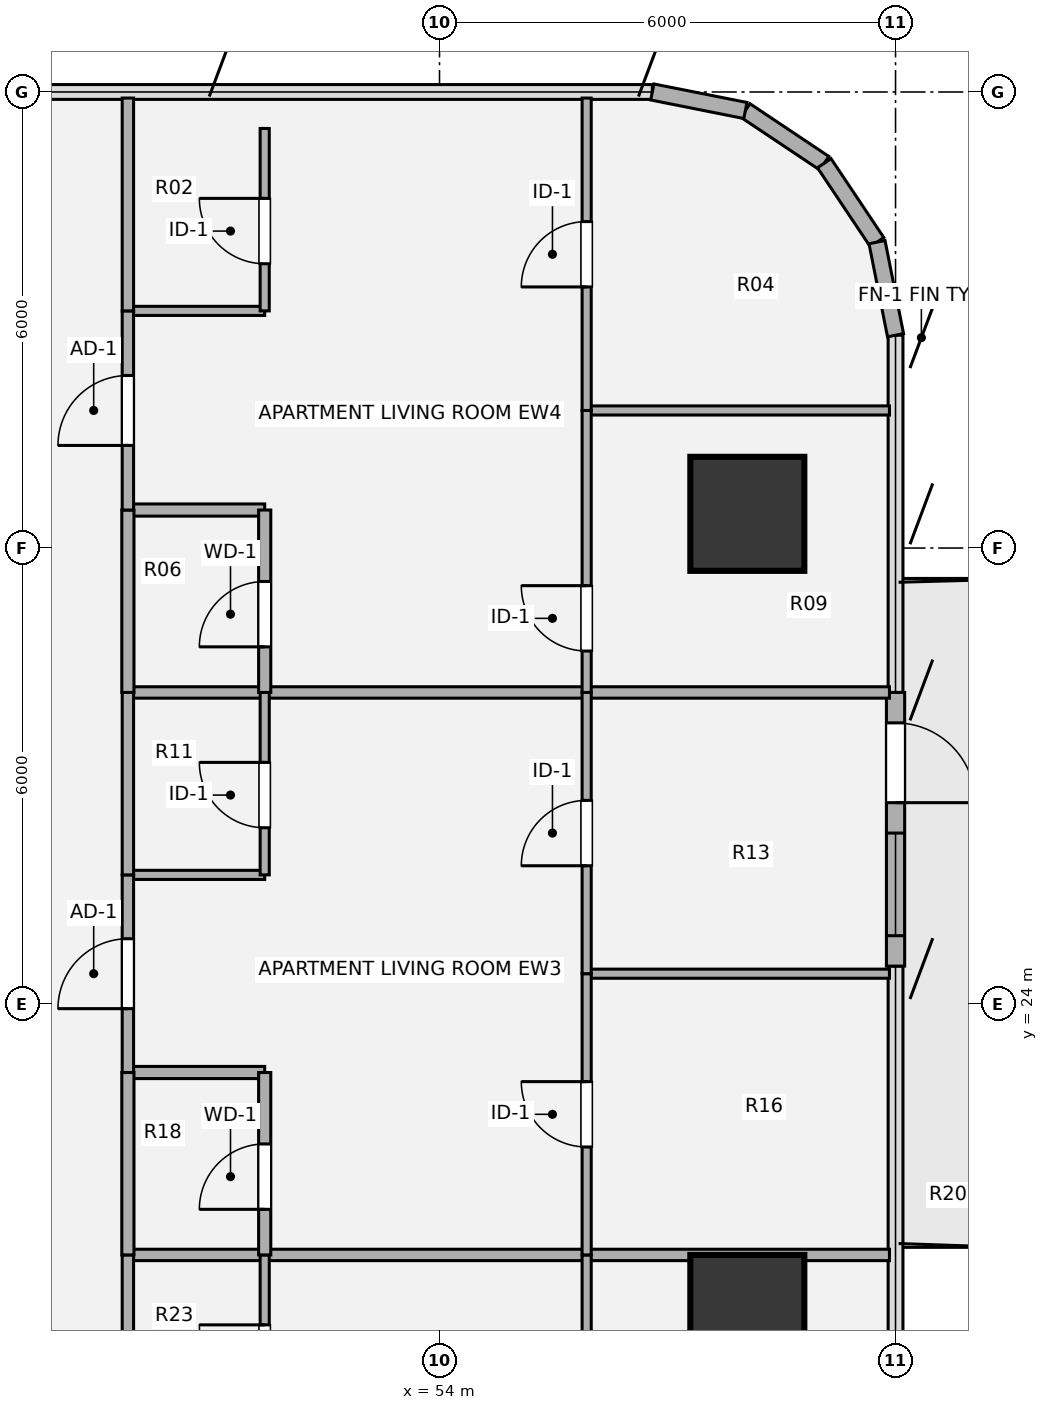
"""IFC4 building model, lengths in metres.
Left out: names, types, materials, properties, quantities, classifications, styles, units other than length and angle.
Written with IfcOpenShell. Run it as: python <this file> out.ifc"""

import sys

from ifc_helpers import new_model, si_unit, direction, frame, frame_2d, origin, origin_2d, place, context, subcontext, project, spatial, rectangle, hollow_circle, extrude, source, transform, mapped, element, fill, save


model = new_model("IFC4")
c1 = context("Model", 3, precision=1e-05, world=origin(), true_north=direction((0.0, 1.0)))
c2 = subcontext(c1, "Body", "Model", "MODEL_VIEW")
j1 = project(units=[si_unit("LENGTHUNIT", "METRE"), si_unit("PLANEANGLEUNIT", "RADIAN")], contexts=[c1])
p1 = place(None, origin())
s1 = spatial("IfcSite", under=j1, at=p1, CompositionType="ELEMENT")
p2 = place(p1, origin())
s2 = spatial("IfcBuilding", under=s1, at=p2, CompositionType="ELEMENT")
p3 = place(p2, frame((0.0, 0.0, 34.56)))
s3 = spatial("IfcBuildingStorey", under=s2, at=p3, CompositionType="ELEMENT", Elevation=34.56)
m1 = source(origin(), c2, "Body", "SweptSolid", [
    extrude(hollow_circle(Radius=0.75, WallThickness=0.05, at=origin_2d()), origin(), (0.0, 0.0, 1.0), 3.78),
])
for number, where, z_axis, x_axis in (
    (1, (58.05, 19.95, 0.0), (0.0, 0.0, 1.0), (1.0, 0.0, 0.0)),
    (2, (58.05, 30.45, 0.0), (0.0, 0.0, 1.0), (1.0, 0.0, 0.0)),
):
    element("IfcColumn", number, at=place(p3, frame(where, z_axis=z_axis, x_axis=x_axis)), inside=s3, PredefinedType="COLUMN", context=c2, shape_type="MappedRepresentation", body=[
        mapped(m1, transform((0.0, 0.0, 0.0), x_axis=(1.0, 0.0, 0.0), y_axis=(0.0, 1.0, 0.0), z_axis=(0.0, 0.0, 1.0), scale=1.0)),
    ])
for number, where, z_axis, x_axis in (
    (3, (58.025, 35.756, 0.0), (0.0, 0.0, 1.0), (0.831, -0.556, 0.0)),
    (4, (59.063, 35.063, 0.0), (0.0, 0.0, 1.0), (0.556, -0.831, 0.0)),
    (5, (59.756, 34.025, 0.0), (0.0, 0.0, 1.0), (0.195, -0.981, 0.0)),
):
    element("IfcWall", number, at=place(p3, frame(where, z_axis=z_axis, x_axis=x_axis)), inside=s3, PredefinedType="SOLIDWALL", context=c2, shape_type="SweptSolid", body=[
        extrude(rectangle(XDim=1.249, YDim=0.215, at=frame_2d((0.624, 0.0))), origin(), (0.0, 0.0, 1.0), 3.53),
    ])
p4 = place(p3, frame((60.0, 28.1, 0.0), z_axis=(0.0, 0.0, 1.0), x_axis=(0.0, -1.0, 0.0)))
e6 = element("IfcWall", 6, at=p4, inside=s3, PredefinedType="SOLIDWALL", context=c2, shape_type="SweptSolid", body=[
    extrude(rectangle(XDim=3.6, YDim=0.24, at=frame_2d((1.8, 0.0))), origin(), (0.0, 0.0, 1.0), 3.53),
])
p5 = place(p4, frame((0.4, 0.0, 0.0)))
e7 = element("IfcOpeningElement", 7, at=p5, cuts=e6, PredefinedType="OPENING", context=c2, shape_type="SweptSolid", body=[
    extrude(rectangle(XDim=1.05, YDim=2.15, at=origin_2d()), frame((0.525, 0.13, 1.075), z_axis=(0.0, -1.0, 0.0), x_axis=(1.0, 0.0, 0.0)), (0.0, 0.0, 1.0), 0.26),
])
p6 = place(p4, frame((1.85, 0.0, 0.85)))
e8 = element("IfcOpeningElement", 8, at=p6, cuts=e6, PredefinedType="OPENING", context=c2, shape_type="SweptSolid", body=[
    extrude(rectangle(XDim=1.35, YDim=1.35, at=origin_2d()), frame((0.675, 0.13, 0.675), z_axis=(0.0, -1.0, 0.0), x_axis=(1.0, 0.0, 0.0)), (0.0, 0.0, 1.0), 0.26),
])
p7 = place(p3, frame((56.8, 36.0, 0.0), z_axis=(0.0, 0.0, 1.0), x_axis=(0.980775717779, -0.195138390419, 0.0)))
e9 = element("IfcWall", 9, at=p7, inside=s3, PredefinedType="SOLIDWALL", context=c2, shape_type="SweptSolid", body=[
    extrude(rectangle(XDim=1.249, YDim=0.215, at=frame_2d((0.624, 0.0))), origin(), (0.0, 0.0, 1.0), 3.53),
])
p8 = place(p3, frame((49.9, 20.7, 0.0), z_axis=(0.0, 0.0, 1.0), x_axis=(1.0, 0.0, 0.0)))
e10 = element("IfcWall", 10, at=p8, inside=s3, PredefinedType="PARTITIONING", context=c2, shape_type="SweptSolid", body=[
    extrude(rectangle(XDim=10.02, YDim=0.15, at=frame_2d((5.01, 0.0))), origin(), (0.0, 0.0, 1.0), 2.982),
])
p9 = place(p3, frame((49.9, 23.1, 0.0), z_axis=(0.0, 0.0, 1.0), x_axis=(1.0, 0.0, 0.0)))
e11 = element("IfcWall", 11, at=p9, inside=s3, PredefinedType="PLUMBINGWALL", context=c2, shape_type="SweptSolid", body=[
    extrude(rectangle(XDim=1.8, YDim=0.16, at=frame_2d((0.9, 0.0))), origin(), (0.0, 0.0, 1.0), 3.055),
])
p10 = place(p3, frame((55.936, 24.4, 0.0), z_axis=(0.0, 0.0, 1.0), x_axis=(1.0, 0.0, 0.0)))
e12 = element("IfcWall", 12, at=p10, inside=s3, PredefinedType="PARTITIONING", context=c2, shape_type="SweptSolid", body=[
    extrude(rectangle(XDim=3.984, YDim=0.12, at=frame_2d((1.992, 0.0))), origin(), (0.0, 0.0, 1.0), 2.982),
])
p11 = place(p3, frame((49.9, 25.7, 0.0), z_axis=(0.0, 0.0, 1.0), x_axis=(1.0, 0.0, 0.0)))
e13 = element("IfcWall", 13, at=p11, inside=s3, PredefinedType="PARTITIONING", context=c2, shape_type="SweptSolid", body=[
    extrude(rectangle(XDim=1.8, YDim=0.12, at=frame_2d((0.9, 0.0))), origin(), (0.0, 0.0, 1.0), 2.982),
])
p12 = place(p3, frame((49.9, 28.1, 0.0), z_axis=(0.0, 0.0, 1.0), x_axis=(1.0, 0.0, 0.0)))
e14 = element("IfcWall", 14, at=p12, inside=s3, PredefinedType="PARTITIONING", context=c2, shape_type="SweptSolid", body=[
    extrude(rectangle(XDim=10.02, YDim=0.15, at=frame_2d((5.01, 0.0))), origin(), (0.0, 0.0, 1.0), 2.982),
])
p13 = place(p3, frame((49.9, 30.5, 0.0), z_axis=(0.0, 0.0, 1.0), x_axis=(1.0, 0.0, 0.0)))
e15 = element("IfcWall", 15, at=p13, inside=s3, PredefinedType="PLUMBINGWALL", context=c2, shape_type="SweptSolid", body=[
    extrude(rectangle(XDim=1.8, YDim=0.16, at=frame_2d((0.9, 0.0))), origin(), (0.0, 0.0, 1.0), 2.903),
])
p14 = place(p3, frame((55.936, 31.81, 0.0), z_axis=(0.0, 0.0, 1.0), x_axis=(1.0, 0.0, 0.0)))
e16 = element("IfcWall", 16, at=p14, inside=s3, PredefinedType="PARTITIONING", context=c2, shape_type="SweptSolid", body=[
    extrude(rectangle(XDim=3.984, YDim=0.12, at=frame_2d((1.992, 0.0))), origin(), (0.0, 0.0, 1.0), 3.5),
])
p15 = place(p3, frame((49.9, 33.12, 0.0), z_axis=(0.0, 0.0, 1.0), x_axis=(1.0, 0.0, 0.0)))
e17 = element("IfcWall", 17, at=p15, inside=s3, PredefinedType="PARTITIONING", context=c2, shape_type="SweptSolid", body=[
    extrude(rectangle(XDim=1.8, YDim=0.12, at=frame_2d((0.9, 0.0))), origin(), (0.0, 0.0, 1.0), 3.055),
])
p16 = place(p3, frame((49.9, 18.3, 0.0), z_axis=(0.0, 0.0, 1.0), x_axis=(0.0, 1.0, 0.0)))
e18 = element("IfcWall", 18, at=p16, inside=s3, PredefinedType="PARTITIONING", context=c2, shape_type="SweptSolid", body=[
    extrude(rectangle(XDim=2.4, YDim=0.15, at=frame_2d((1.2, 0.0))), origin(), (0.0, 0.0, 1.0), 3.5),
])
p17 = place(p3, frame((49.9, 20.7, 0.0), z_axis=(0.0, 0.0, 1.0), x_axis=(0.0, 1.0, 0.0)))
e19 = element("IfcWall", 19, at=p17, inside=s3, PredefinedType="PLUMBINGWALL", context=c2, shape_type="SweptSolid", body=[
    extrude(rectangle(XDim=2.4, YDim=0.16, at=frame_2d((1.2, 0.0))), origin(), (0.0, 0.0, 1.0), 3.5),
])
p18 = place(p3, frame((49.9, 23.1, 0.0), z_axis=(0.0, 0.0, 1.0), x_axis=(0.0, 1.0, 0.0)))
e20 = element("IfcWall", 20, at=p18, inside=s3, PredefinedType="PARTITIONING", context=c2, shape_type="SweptSolid", body=[
    extrude(rectangle(XDim=2.6, YDim=0.15, at=frame_2d((1.3, 0.0))), origin(), (0.0, 0.0, 1.0), 3.5),
])
p19 = place(p18, frame((0.84, 0.0, 0.0)))
e21 = element("IfcOpeningElement", 21, at=p19, cuts=e20, PredefinedType="OPENING", context=c2, shape_type="SweptSolid", body=[
    extrude(rectangle(XDim=0.92, YDim=2.1, at=origin_2d()), frame((0.46, 0.085, 1.05), z_axis=(0.0, -1.0, 0.0), x_axis=(1.0, 0.0, 0.0)), (0.0, 0.0, 1.0), 0.17),
])
p20 = place(p3, frame((49.9, 25.7, 0.0), z_axis=(0.0, 0.0, 1.0), x_axis=(0.0, 1.0, 0.0)))
e22 = element("IfcWall", 22, at=p20, inside=s3, PredefinedType="PARTITIONING", context=c2, shape_type="SweptSolid", body=[
    extrude(rectangle(XDim=2.4, YDim=0.15, at=frame_2d((1.2, 0.0))), origin(), (0.0, 0.0, 1.0), 3.5),
])
p21 = place(p3, frame((49.9, 28.1, 0.0), z_axis=(0.0, 0.0, 1.0), x_axis=(0.0, 1.0, 0.0)))
e23 = element("IfcWall", 23, at=p21, inside=s3, PredefinedType="PLUMBINGWALL", context=c2, shape_type="SweptSolid", body=[
    extrude(rectangle(XDim=2.4, YDim=0.16, at=frame_2d((1.2, 0.0))), origin(), (0.0, 0.0, 1.0), 3.5),
])
p22 = place(p3, frame((49.9, 30.5, 0.0), z_axis=(0.0, 0.0, 1.0), x_axis=(0.0, 1.0, 0.0)))
e24 = element("IfcWall", 24, at=p22, inside=s3, PredefinedType="PARTITIONING", context=c2, shape_type="SweptSolid", body=[
    extrude(rectangle(XDim=2.62, YDim=0.15, at=frame_2d((1.31, 0.0))), origin(), (0.0, 0.0, 1.0), 3.5),
])
p23 = place(p22, frame((0.85, 0.0, 0.0)))
e25 = element("IfcOpeningElement", 25, at=p23, cuts=e24, PredefinedType="OPENING", context=c2, shape_type="SweptSolid", body=[
    extrude(rectangle(XDim=0.92, YDim=2.1, at=origin_2d()), frame((0.46, 0.085, 1.05), z_axis=(0.0, -1.0, 0.0), x_axis=(1.0, 0.0, 0.0)), (0.0, 0.0, 1.0), 0.17),
])
p24 = place(p3, frame((49.9, 33.12, 0.0), z_axis=(0.0, 0.0, 1.0), x_axis=(0.0, 1.0, 0.0)))
e26 = element("IfcWall", 26, at=p24, inside=s3, PredefinedType="PARTITIONING", context=c2, shape_type="SweptSolid", body=[
    extrude(rectangle(XDim=2.8, YDim=0.15, at=frame_2d((1.4, 0.0))), origin(), (0.0, 0.0, 1.0), 3.5),
])
p25 = place(p3, frame((51.7, 18.3, 0.0), z_axis=(0.0, 0.0, 1.0), x_axis=(0.0, 1.0, 0.0)))
e27 = element("IfcWall", 27, at=p25, inside=s3, PredefinedType="PARTITIONING", context=c2, shape_type="SweptSolid", body=[
    extrude(rectangle(XDim=2.4, YDim=0.12, at=frame_2d((1.2, 0.0))), origin(), (0.0, 0.0, 1.0), 3.5),
])
p26 = place(p25, frame((0.62, 0.0, 0.0)))
e28 = element("IfcOpeningElement", 28, at=p26, cuts=e27, PredefinedType="OPENING", context=c2, shape_type="SweptSolid", body=[
    extrude(rectangle(XDim=0.86, YDim=2.1, at=origin_2d()), frame((0.43, 0.07, 1.05), z_axis=(0.0, -1.0, 0.0), x_axis=(1.0, 0.0, 0.0)), (0.0, 0.0, 1.0), 0.14),
])
p27 = place(p3, frame((51.7, 20.7, 0.0), z_axis=(0.0, 0.0, 1.0), x_axis=(0.0, 1.0, 0.0)))
e29 = element("IfcWall", 29, at=p27, inside=s3, PredefinedType="PLUMBINGWALL", context=c2, shape_type="SweptSolid", body=[
    extrude(rectangle(XDim=2.4, YDim=0.16, at=frame_2d((1.2, 0.0))), origin(), (0.0, 0.0, 1.0), 3.5),
])
p28 = place(p27, frame((0.6, 0.0, 0.0)))
e30 = element("IfcOpeningElement", 30, at=p28, cuts=e29, PredefinedType="OPENING", context=c2, shape_type="SweptSolid", body=[
    extrude(rectangle(XDim=0.86, YDim=2.1, at=origin_2d()), frame((0.43, 0.09, 1.05), z_axis=(0.0, -1.0, 0.0), x_axis=(1.0, 0.0, 0.0)), (0.0, 0.0, 1.0), 0.18),
])
p29 = place(p3, frame((51.7, 25.7, 0.0), z_axis=(0.0, 0.0, 1.0), x_axis=(0.0, 1.0, 0.0)))
e31 = element("IfcWall", 31, at=p29, inside=s3, PredefinedType="PARTITIONING", context=c2, shape_type="SweptSolid", body=[
    extrude(rectangle(XDim=2.4, YDim=0.12, at=frame_2d((1.2, 0.0))), origin(), (0.0, 0.0, 1.0), 3.5),
])
p30 = place(p29, frame((0.62, 0.0, 0.0)))
e32 = element("IfcOpeningElement", 32, at=p30, cuts=e31, PredefinedType="OPENING", context=c2, shape_type="SweptSolid", body=[
    extrude(rectangle(XDim=0.86, YDim=2.1, at=origin_2d()), frame((0.43, 0.07, 1.05), z_axis=(0.0, -1.0, 0.0), x_axis=(1.0, 0.0, 0.0)), (0.0, 0.0, 1.0), 0.14),
])
p31 = place(p3, frame((51.7, 28.1, 0.0), z_axis=(0.0, 0.0, 1.0), x_axis=(0.0, 1.0, 0.0)))
e33 = element("IfcWall", 33, at=p31, inside=s3, PredefinedType="PLUMBINGWALL", context=c2, shape_type="SweptSolid", body=[
    extrude(rectangle(XDim=2.4, YDim=0.16, at=frame_2d((1.2, 0.0))), origin(), (0.0, 0.0, 1.0), 3.5),
])
p32 = place(p31, frame((0.6, 0.0, 0.0)))
e34 = element("IfcOpeningElement", 34, at=p32, cuts=e33, PredefinedType="OPENING", context=c2, shape_type="SweptSolid", body=[
    extrude(rectangle(XDim=0.86, YDim=2.1, at=origin_2d()), frame((0.43, 0.09, 1.05), z_axis=(0.0, -1.0, 0.0), x_axis=(1.0, 0.0, 0.0)), (0.0, 0.0, 1.0), 0.18),
])
p33 = place(p3, frame((51.7, 33.12, 0.0), z_axis=(0.0, 0.0, 1.0), x_axis=(0.0, 1.0, 0.0)))
e35 = element("IfcWall", 35, at=p33, inside=s3, PredefinedType="PARTITIONING", context=c2, shape_type="SweptSolid", body=[
    extrude(rectangle(XDim=2.4, YDim=0.12, at=frame_2d((1.2, 0.0))), origin(), (0.0, 0.0, 1.0), 3.5),
])
p34 = place(p33, frame((0.62, 0.0, 0.0)))
e36 = element("IfcOpeningElement", 36, at=p34, cuts=e35, PredefinedType="OPENING", context=c2, shape_type="SweptSolid", body=[
    extrude(rectangle(XDim=0.86, YDim=2.1, at=origin_2d()), frame((0.43, 0.07, 1.05), z_axis=(0.0, -1.0, 0.0), x_axis=(1.0, 0.0, 0.0)), (0.0, 0.0, 1.0), 0.14),
])
p35 = place(p3, frame((55.936, 17.05, 0.0), z_axis=(0.0, 0.0, 1.0), x_axis=(0.0, 1.0, 0.0)))
e37 = element("IfcWall", 37, at=p35, inside=s3, PredefinedType="PARTITIONING", context=c2, shape_type="SweptSolid", body=[
    extrude(rectangle(XDim=3.65, YDim=0.12, at=frame_2d((1.825, 0.0))), origin(), (0.0, 0.0, 1.0), 3.5),
])
p36 = place(p35, frame((1.075, 0.0, 0.0)))
e38 = element("IfcOpeningElement", 38, at=p36, cuts=e37, PredefinedType="OPENING", context=c2, shape_type="SweptSolid", body=[
    extrude(rectangle(XDim=0.86, YDim=2.1, at=origin_2d()), frame((0.43, 0.07, 1.05), z_axis=(0.0, -1.0, 0.0), x_axis=(1.0, 0.0, 0.0)), (0.0, 0.0, 1.0), 0.14),
])
p37 = place(p3, frame((55.936, 20.7, 0.0), z_axis=(0.0, 0.0, 1.0), x_axis=(0.0, 1.0, 0.0)))
e39 = element("IfcWall", 39, at=p37, inside=s3, PredefinedType="PARTITIONING", context=c2, shape_type="SweptSolid", body=[
    extrude(rectangle(XDim=3.7, YDim=0.12, at=frame_2d((1.85, 0.0))), origin(), (0.0, 0.0, 1.0), 3.5),
])
p38 = place(p37, frame((1.42, 0.0, 0.0)))
e40 = element("IfcOpeningElement", 40, at=p38, cuts=e39, PredefinedType="OPENING", context=c2, shape_type="SweptSolid", body=[
    extrude(rectangle(XDim=0.86, YDim=2.1, at=origin_2d()), frame((0.43, 0.07, 1.05), z_axis=(0.0, -1.0, 0.0), x_axis=(1.0, 0.0, 0.0)), (0.0, 0.0, 1.0), 0.14),
])
p39 = place(p3, frame((55.936, 24.4, 0.0), z_axis=(0.0, 0.0, 1.0), x_axis=(0.0, 1.0, 0.0)))
e41 = element("IfcWall", 41, at=p39, inside=s3, PredefinedType="PARTITIONING", context=c2, shape_type="SweptSolid", body=[
    extrude(rectangle(XDim=3.7, YDim=0.12, at=frame_2d((1.85, 0.0))), origin(), (0.0, 0.0, 1.0), 3.5),
])
p40 = place(p39, frame((1.42, 0.0, 0.0)))
e42 = element("IfcOpeningElement", 42, at=p40, cuts=e41, PredefinedType="OPENING", context=c2, shape_type="SweptSolid", body=[
    extrude(rectangle(XDim=0.86, YDim=2.1, at=origin_2d()), frame((0.43, 0.07, 1.05), z_axis=(0.0, -1.0, 0.0), x_axis=(1.0, 0.0, 0.0)), (0.0, 0.0, 1.0), 0.14),
])
p41 = place(p3, frame((55.936, 28.1, 0.0), z_axis=(0.0, 0.0, 1.0), x_axis=(0.0, 1.0, 0.0)))
e43 = element("IfcWall", 43, at=p41, inside=s3, PredefinedType="PARTITIONING", context=c2, shape_type="SweptSolid", body=[
    extrude(rectangle(XDim=3.71, YDim=0.12, at=frame_2d((1.855, 0.0))), origin(), (0.0, 0.0, 1.0), 3.5),
])
p42 = place(p41, frame((0.545, 0.0, 0.0)))
e44 = element("IfcOpeningElement", 44, at=p42, cuts=e43, PredefinedType="OPENING", context=c2, shape_type="SweptSolid", body=[
    extrude(rectangle(XDim=0.86, YDim=2.1, at=origin_2d()), frame((0.43, 0.07, 1.05), z_axis=(0.0, -1.0, 0.0), x_axis=(1.0, 0.0, 0.0)), (0.0, 0.0, 1.0), 0.14),
])
p43 = place(p3, frame((55.936, 31.81, 0.0), z_axis=(0.0, 0.0, 1.0), x_axis=(0.0, 1.0, 0.0)))
e45 = element("IfcWall", 45, at=p43, inside=s3, PredefinedType="PARTITIONING", context=c2, shape_type="SweptSolid", body=[
    extrude(rectangle(XDim=4.11, YDim=0.12, at=frame_2d((2.055, 0.0))), origin(), (0.0, 0.0, 1.0), 3.5),
])
p44 = place(p43, frame((1.625, 0.0, 0.0)))
e46 = element("IfcOpeningElement", 46, at=p44, cuts=e45, PredefinedType="OPENING", context=c2, shape_type="SweptSolid", body=[
    extrude(rectangle(XDim=0.86, YDim=2.1, at=origin_2d()), frame((0.43, 0.07, 1.05), z_axis=(0.0, -1.0, 0.0), x_axis=(1.0, 0.0, 0.0)), (0.0, 0.0, 1.0), 0.14),
])
m2 = source(origin(), c2, "Body", "SweptSolid", [
    extrude(rectangle(XDim=1.05, YDim=2.15, at=origin_2d()), frame((0.525, 0.025, 1.075), z_axis=(0.0, -1.0, 0.0), x_axis=(1.0, 0.0, 0.0)), (0.0, 0.0, 1.0), 0.05),
])
p45 = place(p5, origin())
e47 = element("IfcDoor", 47, at=p45, inside=s3, OperationType="SINGLE_SWING_RIGHT", PredefinedType="DOOR", context=c2, shape_type="MappedRepresentation", body=[
    mapped(m2, transform((0.0, 0.0, 0.0), x_axis=(1.0, 0.0, 0.0), y_axis=(0.0, 1.0, 0.0), z_axis=(0.0, 0.0, 1.0), scale=1.0)),
])
fill(e7, e47)
m3 = source(origin(), c2, "Body", "SweptSolid", [
    extrude(rectangle(XDim=1.35, YDim=1.35, at=origin_2d()), frame((0.675, 0.03, 0.675), z_axis=(0.0, -1.0, 0.0), x_axis=(1.0, 0.0, 0.0)), (0.0, 0.0, 1.0), 0.06),
])
p46 = place(p6, origin())
e48 = element("IfcWindow", 48, at=p46, inside=s3, PartitioningType="SINGLE_PANEL", PredefinedType="WINDOW", context=c2, shape_type="MappedRepresentation", body=[
    mapped(m3, transform((0.0, 0.0, 0.0), x_axis=(1.0, 0.0, 0.0), y_axis=(0.0, 1.0, 0.0), z_axis=(0.0, 0.0, 1.0), scale=1.0)),
])
fill(e8, e48)
m4 = source(origin(), c2, "Body", "SweptSolid", [
    extrude(rectangle(XDim=0.92, YDim=2.1, at=origin_2d()), frame((0.46, 0.025, 1.05), z_axis=(0.0, -1.0, 0.0), x_axis=(1.0, 0.0, 0.0)), (0.0, 0.0, 1.0), 0.05),
])
p47 = place(p19, origin())
e49 = element("IfcDoor", 49, at=p47, inside=s3, OperationType="SINGLE_SWING_LEFT", PredefinedType="DOOR", context=c2, shape_type="MappedRepresentation", body=[
    mapped(m4, transform((0.0, 0.0, 0.0), x_axis=(1.0, 0.0, 0.0), y_axis=(0.0, 1.0, 0.0), z_axis=(0.0, 0.0, 1.0), scale=1.0)),
])
fill(e21, e49)
p48 = place(p23, origin())
e50 = element("IfcDoor", 50, at=p48, inside=s3, OperationType="SINGLE_SWING_LEFT", PredefinedType="DOOR", context=c2, shape_type="MappedRepresentation", body=[
    mapped(m4, transform((0.0, 0.0, 0.0), x_axis=(1.0, 0.0, 0.0), y_axis=(0.0, 1.0, 0.0), z_axis=(0.0, 0.0, 1.0), scale=1.0)),
])
fill(e25, e50)
m5 = source(origin(), c2, "Body", "SweptSolid", [
    extrude(rectangle(XDim=0.86, YDim=2.1, at=origin_2d()), frame((0.43, 0.025, 1.05), z_axis=(0.0, -1.0, 0.0), x_axis=(1.0, 0.0, 0.0)), (0.0, 0.0, 1.0), 0.05),
])
p49 = place(p26, origin())
e51 = element("IfcDoor", 51, at=p49, inside=s3, OperationType="SINGLE_SWING_RIGHT", PredefinedType="DOOR", context=c2, shape_type="MappedRepresentation", body=[
    mapped(m5, transform((0.0, 0.0, 0.0), x_axis=(1.0, 0.0, 0.0), y_axis=(0.0, 1.0, 0.0), z_axis=(0.0, 0.0, 1.0), scale=1.0)),
])
fill(e28, e51)
m6 = source(origin(), c2, "Body", "SweptSolid", [
    extrude(rectangle(XDim=0.86, YDim=2.1, at=origin_2d()), frame((0.43, 0.025, 1.05), z_axis=(0.0, -1.0, 0.0), x_axis=(1.0, 0.0, 0.0)), (0.0, 0.0, 1.0), 0.05),
])
p50 = place(p28, origin())
e52 = element("IfcDoor", 52, at=p50, inside=s3, OperationType="SINGLE_SWING_LEFT", PredefinedType="DOOR", context=c2, shape_type="MappedRepresentation", body=[
    mapped(m6, transform((0.0, 0.0, 0.0), x_axis=(1.0, 0.0, 0.0), y_axis=(0.0, 1.0, 0.0), z_axis=(0.0, 0.0, 1.0), scale=1.0)),
])
fill(e30, e52)
p51 = place(p30, origin())
e53 = element("IfcDoor", 53, at=p51, inside=s3, OperationType="SINGLE_SWING_RIGHT", PredefinedType="DOOR", context=c2, shape_type="MappedRepresentation", body=[
    mapped(m5, transform((0.0, 0.0, 0.0), x_axis=(1.0, 0.0, 0.0), y_axis=(0.0, 1.0, 0.0), z_axis=(0.0, 0.0, 1.0), scale=1.0)),
])
fill(e32, e53)
p52 = place(p32, origin())
e54 = element("IfcDoor", 54, at=p52, inside=s3, OperationType="SINGLE_SWING_LEFT", PredefinedType="DOOR", context=c2, shape_type="MappedRepresentation", body=[
    mapped(m6, transform((0.0, 0.0, 0.0), x_axis=(1.0, 0.0, 0.0), y_axis=(0.0, 1.0, 0.0), z_axis=(0.0, 0.0, 1.0), scale=1.0)),
])
fill(e34, e54)
p53 = place(p34, origin())
e55 = element("IfcDoor", 55, at=p53, inside=s3, OperationType="SINGLE_SWING_RIGHT", PredefinedType="DOOR", context=c2, shape_type="MappedRepresentation", body=[
    mapped(m5, transform((0.0, 0.0, 0.0), x_axis=(1.0, 0.0, 0.0), y_axis=(0.0, 1.0, 0.0), z_axis=(0.0, 0.0, 1.0), scale=1.0)),
])
fill(e36, e55)
p54 = place(p38, origin())
e56 = element("IfcDoor", 56, at=p54, inside=s3, OperationType="SINGLE_SWING_RIGHT", PredefinedType="DOOR", context=c2, shape_type="MappedRepresentation", body=[
    mapped(m5, transform((0.0, 0.0, 0.0), x_axis=(1.0, 0.0, 0.0), y_axis=(0.0, 1.0, 0.0), z_axis=(0.0, 0.0, 1.0), scale=1.0)),
])
fill(e40, e56)
p55 = place(p40, origin())
e57 = element("IfcDoor", 57, at=p55, inside=s3, OperationType="SINGLE_SWING_LEFT", PredefinedType="DOOR", context=c2, shape_type="MappedRepresentation", body=[
    mapped(m5, transform((0.0, 0.0, 0.0), x_axis=(1.0, 0.0, 0.0), y_axis=(0.0, 1.0, 0.0), z_axis=(0.0, 0.0, 1.0), scale=1.0)),
])
fill(e42, e57)
p56 = place(p42, origin())
e58 = element("IfcDoor", 58, at=p56, inside=s3, OperationType="SINGLE_SWING_RIGHT", PredefinedType="DOOR", context=c2, shape_type="MappedRepresentation", body=[
    mapped(m5, transform((0.0, 0.0, 0.0), x_axis=(1.0, 0.0, 0.0), y_axis=(0.0, 1.0, 0.0), z_axis=(0.0, 0.0, 1.0), scale=1.0)),
])
fill(e44, e58)
p57 = place(p44, origin())
e59 = element("IfcDoor", 59, at=p57, inside=s3, OperationType="SINGLE_SWING_LEFT", PredefinedType="DOOR", context=c2, shape_type="MappedRepresentation", body=[
    mapped(m5, transform((0.0, 0.0, 0.0), x_axis=(1.0, 0.0, 0.0), y_axis=(0.0, 1.0, 0.0), z_axis=(0.0, 0.0, 1.0), scale=1.0)),
])
fill(e46, e59)
save(model, sys.argv[1])
